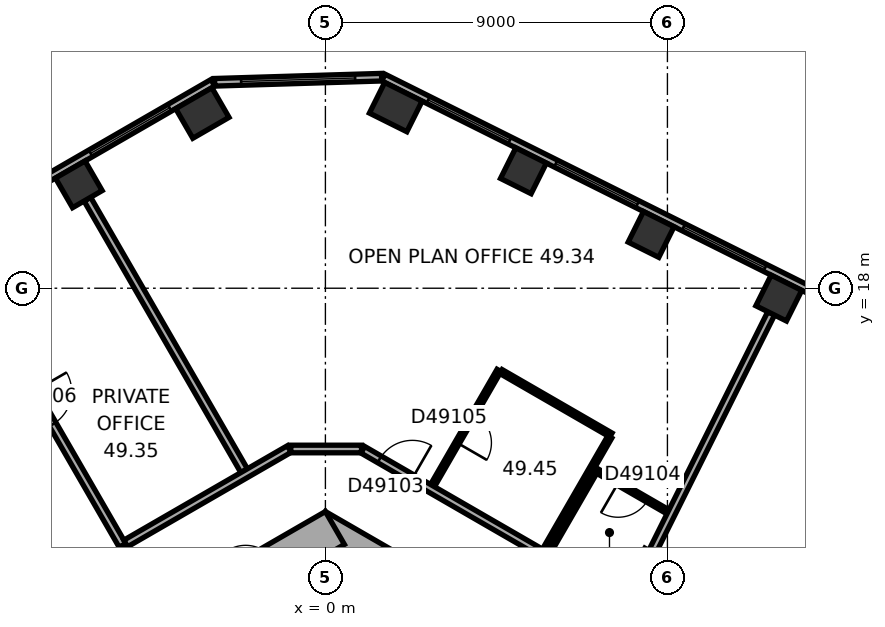
"""IFC4 building model, lengths in metres.
Left out: names, types, materials, properties, quantities, classifications, styles, units other than length and angle.
Written with IfcOpenShell. Run it as: python <this file> out.ifc"""

import sys

from ifc_helpers import new_model, si_unit, direction, frame, frame_2d, origin, origin_2d, place, context, subcontext, project, spatial, rectangle, extrude, element, fill, save


model = new_model("IFC4")
c1 = context("Model", 3, precision=1e-05, world=origin(), true_north=direction((0.0, 1.0)))
c2 = subcontext(c1, "Body", "Model", "MODEL_VIEW")
j1 = project(units=[si_unit("LENGTHUNIT", "METRE"), si_unit("PLANEANGLEUNIT", "RADIAN")], contexts=[c1])
p1 = place(None, origin())
s1 = spatial("IfcSite", under=j1, at=p1, CompositionType="ELEMENT")
p2 = place(p1, origin())
s2 = spatial("IfcBuilding", under=s1, at=p2, CompositionType="ELEMENT")
p3 = place(p2, frame((0.0, 0.0, 198.4)))
s3 = spatial("IfcBuildingStorey", under=s2, at=p3, CompositionType="ELEMENT", Elevation=198.4)
for number, where, z_axis, x_axis in (
    (1, (11.931, 17.74, 0.0), (0.0, 0.0, 1.0), (-0.895, 0.446, 0.0)),
    (2, (8.571, 19.416, 0.0), (0.0, 0.0, 1.0), (-0.895, 0.446, 0.0)),
    (3, (5.211, 21.091, 0.0), (0.0, 0.0, 1.0), (-0.895, 0.446, 0.0)),
):
    element("IfcColumn", number, at=place(p3, frame(where, z_axis=z_axis, x_axis=x_axis)), inside=s3, PredefinedType="COLUMN", context=c2, shape_type="SweptSolid", body=[
        extrude(rectangle(XDim=0.9, YDim=0.9, at=origin_2d()), origin(), (0.0, 0.0, 1.0), 3.7),
    ])
for number, where, z_axis, x_axis in (
    (4, (1.852, 22.766, 0.0), (0.0, 0.0, 1.0), (-0.895, 0.446, 0.0)),
    (5, (-3.238, 22.61, 0.0), (0.0, 0.0, 1.0), (-0.866, -0.5, 0.0)),
):
    element("IfcColumn", number, at=place(p3, frame(where, z_axis=z_axis, x_axis=x_axis)), inside=s3, PredefinedType="COLUMN", context=c2, shape_type="SweptSolid", body=[
        extrude(rectangle(XDim=1.1, YDim=0.9, at=origin_2d()), origin(), (0.0, 0.0, 1.0), 3.7),
    ])
p4 = place(p3, frame((-6.489, 20.733, 0.0), z_axis=(0.0, 0.0, 1.0), x_axis=(-0.866025403784, -0.5, 0.0)))
e6 = element("IfcColumn", 6, at=p4, inside=s3, PredefinedType="COLUMN", context=c2, shape_type="SweptSolid", body=[
    extrude(rectangle(XDim=0.9, YDim=0.9, at=origin_2d()), origin(), (0.0, 0.0, 1.0), 3.7),
])
p5 = place(p3, frame((10.25, 5.629, 0.0), z_axis=(0.0, 0.0, 1.0), x_axis=(-0.866022616891, 0.50000482701, 0.0)))
e7 = element("IfcWall", 7, at=p5, inside=s3, PredefinedType="SHEAR", context=c2, shape_type="SweptSolid", body=[
    extrude(rectangle(XDim=12.125, YDim=1.0, at=frame_2d((6.062, 0.0))), origin(), (0.0, 0.0, 1.0), 3.7),
])
p6 = place(p5, frame((2.712, 0.0, 0.0)))
e8 = element("IfcOpeningElement", 8, at=p6, cuts=e7, PredefinedType="OPENING", context=c2, shape_type="SweptSolid", body=[
    extrude(rectangle(XDim=0.9, YDim=2.1, at=frame_2d((0.45, 1.05))), frame((0.0, 0.51, 0.0), z_axis=(0.0, -1.0, 0.0), x_axis=(1.0, 0.0, 0.0)), (0.0, 0.0, 1.0), 1.02),
])
p7 = place(p5, frame((6.612, 0.0, 0.0)))
e9 = element("IfcOpeningElement", 9, at=p7, cuts=e7, PredefinedType="OPENING", context=c2, shape_type="SweptSolid", body=[
    extrude(rectangle(XDim=0.9, YDim=2.1, at=frame_2d((0.45, 1.05))), frame((0.0, 0.51, 0.0), z_axis=(0.0, -1.0, 0.0), x_axis=(1.0, 0.0, 0.0)), (0.0, 0.0, 1.0), 1.02),
])
p8 = place(p3, frame((0.25, 11.691, 0.0), z_axis=(0.0, 0.0, 1.0), x_axis=(-0.866022616891, -0.50000482701, 0.0)))
e10 = element("IfcWall", 10, at=p8, inside=s3, PredefinedType="SHEAR", context=c2, shape_type="SweptSolid", body=[
    extrude(rectangle(XDim=12.125, YDim=1.0, at=frame_2d((6.062, 0.0))), origin(), (0.0, 0.0, 1.0), 3.7),
])
p9 = place(p8, frame((6.262, 0.0, 0.0)))
e11 = element("IfcOpeningElement", 11, at=p9, cuts=e10, PredefinedType="OPENING", context=c2, shape_type="SweptSolid", body=[
    extrude(rectangle(XDim=1.5, YDim=2.1, at=frame_2d((0.75, 1.05))), frame((0.0, 0.51, 0.0), z_axis=(0.0, -1.0, 0.0), x_axis=(1.0, 0.0, 0.0)), (0.0, 0.0, 1.0), 1.02),
])
p10 = place(p8, frame((1.812, 0.0, 0.0)))
e12 = element("IfcOpeningElement", 12, at=p10, cuts=e10, PredefinedType="OPENING", context=c2, shape_type="SweptSolid", body=[
    extrude(rectangle(XDim=0.9, YDim=2.1, at=frame_2d((0.45, 1.05))), frame((0.0, 0.51, 0.0), z_axis=(0.0, -1.0, 0.0), x_axis=(1.0, 0.0, 0.0)), (0.0, 0.0, 1.0), 1.02),
])
p11 = place(p8, frame((4.412, 0.0, 0.0)))
e13 = element("IfcOpeningElement", 13, at=p11, cuts=e10, PredefinedType="OPENING", context=c2, shape_type="SweptSolid", body=[
    extrude(rectangle(XDim=0.9, YDim=2.1, at=frame_2d((0.45, 1.05))), frame((0.0, 0.51, 0.0), z_axis=(0.0, -1.0, 0.0), x_axis=(1.0, 0.0, 0.0)), (0.0, 0.0, 1.0), 1.02),
])
p12 = place(p3, frame((19.464, 14.599, 0.0), z_axis=(0.0, 0.0, 1.0), x_axis=(-0.894935755043, 0.446195018289, 0.0)))
e14 = element("IfcWall", 14, at=p12, inside=s3, PredefinedType="STANDARD", context=c2, shape_type="SweptSolid", body=[
    extrude(rectangle(XDim=20.044, YDim=0.2, at=frame_2d((10.022, 0.0))), origin(), (0.0, 0.0, 1.0), 3.7),
])
p13 = place(p12, frame((1.313, 0.0, 0.9)))
e15 = element("IfcOpeningElement", 15, at=p13, cuts=e14, PredefinedType="OPENING", context=c2, shape_type="SweptSolid", body=[
    extrude(rectangle(XDim=2.4, YDim=2.0, at=frame_2d((1.2, 1.0))), frame((0.0, 0.11, 0.0), z_axis=(0.0, -1.0, 0.0), x_axis=(1.0, 0.0, 0.0)), (0.0, 0.0, 1.0), 0.22),
])
p14 = place(p12, frame((5.067, 0.0, 0.9)))
e16 = element("IfcOpeningElement", 16, at=p14, cuts=e14, PredefinedType="OPENING", context=c2, shape_type="SweptSolid", body=[
    extrude(rectangle(XDim=2.4, YDim=2.0, at=frame_2d((1.2, 1.0))), frame((0.0, 0.11, 0.0), z_axis=(0.0, -1.0, 0.0), x_axis=(1.0, 0.0, 0.0)), (0.0, 0.0, 1.0), 0.22),
])
p15 = place(p12, frame((8.821, 0.0, 0.9)))
e17 = element("IfcOpeningElement", 17, at=p15, cuts=e14, PredefinedType="OPENING", context=c2, shape_type="SweptSolid", body=[
    extrude(rectangle(XDim=2.4, YDim=2.0, at=frame_2d((1.2, 1.0))), frame((0.0, 0.11, 0.0), z_axis=(0.0, -1.0, 0.0), x_axis=(1.0, 0.0, 0.0)), (0.0, 0.0, 1.0), 0.22),
])
p16 = place(p12, frame((12.575, 0.0, 0.9)))
e18 = element("IfcOpeningElement", 18, at=p16, cuts=e14, PredefinedType="OPENING", context=c2, shape_type="SweptSolid", body=[
    extrude(rectangle(XDim=2.4, YDim=2.0, at=frame_2d((1.2, 1.0))), frame((0.0, 0.11, 0.0), z_axis=(0.0, -1.0, 0.0), x_axis=(1.0, 0.0, 0.0)), (0.0, 0.0, 1.0), 0.22),
])
p17 = place(p12, frame((16.329, 0.0, 0.9)))
e19 = element("IfcOpeningElement", 19, at=p17, cuts=e14, PredefinedType="OPENING", context=c2, shape_type="SweptSolid", body=[
    extrude(rectangle(XDim=2.4, YDim=2.0, at=frame_2d((1.2, 1.0))), frame((0.0, 0.11, 0.0), z_axis=(0.0, -1.0, 0.0), x_axis=(1.0, 0.0, 0.0)), (0.0, 0.0, 1.0), 0.22),
])
p18 = place(p3, frame((1.479, 23.553, 0.0), z_axis=(0.0, 0.0, 1.0), x_axis=(-0.999534786117, -0.03049936625, 0.0)))
e20 = element("IfcWall", 20, at=p18, inside=s3, PredefinedType="STANDARD", context=c2, shape_type="SweptSolid", body=[
    extrude(rectangle(XDim=4.395, YDim=0.2, at=frame_2d((2.197, 0.0))), origin(), (0.0, 0.0, 1.0), 3.7),
])
p19 = place(p18, frame((0.698, 0.0, 0.9)))
e21 = element("IfcOpeningElement", 21, at=p19, cuts=e20, PredefinedType="OPENING", context=c2, shape_type="SweptSolid", body=[
    extrude(rectangle(XDim=3.0, YDim=2.0, at=frame_2d((1.5, 1.0))), frame((0.0, 0.11, 0.0), z_axis=(0.0, -1.0, 0.0), x_axis=(1.0, 0.0, 0.0)), (0.0, 0.0, 1.0), 0.22),
])
p20 = place(p3, frame((-2.961, 23.405, 0.0), z_axis=(0.0, 0.0, 1.0), x_axis=(-0.866023315909, -0.500003616288, 0.0)))
e22 = element("IfcWall", 22, at=p20, inside=s3, PredefinedType="STANDARD", context=c2, shape_type="SweptSolid", body=[
    extrude(rectangle(XDim=20.044, YDim=0.2, at=frame_2d((10.022, 0.0))), origin(), (0.0, 0.0, 1.0), 3.7),
])
p21 = place(p20, frame((1.314, 0.0, 0.9)))
e23 = element("IfcOpeningElement", 23, at=p21, cuts=e22, PredefinedType="OPENING", context=c2, shape_type="SweptSolid", body=[
    extrude(rectangle(XDim=2.4, YDim=2.0, at=frame_2d((1.2, 1.0))), frame((0.0, 0.11, 0.0), z_axis=(0.0, -1.0, 0.0), x_axis=(1.0, 0.0, 0.0)), (0.0, 0.0, 1.0), 0.22),
])
p22 = place(p20, frame((5.069, 0.0, 0.9)))
e24 = element("IfcOpeningElement", 24, at=p22, cuts=e22, PredefinedType="OPENING", context=c2, shape_type="SweptSolid", body=[
    extrude(rectangle(XDim=2.4, YDim=2.0, at=frame_2d((1.2, 1.0))), frame((0.0, 0.11, 0.0), z_axis=(0.0, -1.0, 0.0), x_axis=(1.0, 0.0, 0.0)), (0.0, 0.0, 1.0), 0.22),
])
p23 = place(p20, frame((8.823, 0.0, 0.9)))
e25 = element("IfcOpeningElement", 25, at=p23, cuts=e22, PredefinedType="OPENING", context=c2, shape_type="SweptSolid", body=[
    extrude(rectangle(XDim=2.4, YDim=2.0, at=frame_2d((1.2, 1.0))), frame((0.0, 0.11, 0.0), z_axis=(0.0, -1.0, 0.0), x_axis=(1.0, 0.0, 0.0)), (0.0, 0.0, 1.0), 0.22),
])
p24 = place(p20, frame((12.577, 0.0, 0.9)))
e26 = element("IfcOpeningElement", 26, at=p24, cuts=e22, PredefinedType="OPENING", context=c2, shape_type="SweptSolid", body=[
    extrude(rectangle(XDim=2.4, YDim=2.0, at=frame_2d((1.2, 1.0))), frame((0.0, 0.11, 0.0), z_axis=(0.0, -1.0, 0.0), x_axis=(1.0, 0.0, 0.0)), (0.0, 0.0, 1.0), 0.22),
])
p25 = place(p20, frame((16.331, 0.0, 0.9)))
e27 = element("IfcOpeningElement", 27, at=p25, cuts=e22, PredefinedType="OPENING", context=c2, shape_type="SweptSolid", body=[
    extrude(rectangle(XDim=2.4, YDim=2.0, at=frame_2d((1.2, 1.0))), frame((0.0, 0.11, 0.0), z_axis=(0.0, -1.0, 0.0), x_axis=(1.0, 0.0, 0.0)), (0.0, 0.0, 1.0), 0.22),
])
p26 = place(p3, frame((-9.515, 18.466, 0.0), z_axis=(0.0, 0.0, 1.0), x_axis=(0.500010139422, -0.866019549707, 0.0)))
e28 = element("IfcWall", 28, at=p26, inside=s3, PredefinedType="PARTITIONING", context=c2, shape_type="SweptSolid", body=[
    extrude(rectangle(XDim=8.35, YDim=0.2, at=frame_2d((4.175, 0.0))), origin(), (0.0, 0.0, 1.0), 2.87),
])
p27 = place(p26, frame((3.675, 0.0, 0.0)))
e29 = element("IfcOpeningElement", 29, at=p27, cuts=e28, PredefinedType="OPENING", context=c2, shape_type="SweptSolid", body=[
    extrude(rectangle(XDim=1.0, YDim=2.1, at=frame_2d((0.5, 1.05))), frame((0.0, 0.11, 0.0), z_axis=(0.0, -1.0, 0.0), x_axis=(1.0, 0.0, 0.0)), (0.0, 0.0, 1.0), 0.22),
])
p28 = place(p3, frame((-6.264, 20.344, 0.0), z_axis=(0.0, 0.0, 1.0), x_axis=(0.499996545922, -0.866027397988, 0.0)))
e30 = element("IfcWall", 30, at=p28, inside=s3, PredefinedType="PARTITIONING", context=c2, shape_type="SweptSolid", body=[
    extrude(rectangle(XDim=8.25, YDim=0.2, at=frame_2d((4.125, 0.0))), origin(), (0.0, 0.0, 1.0), 3.42),
])
p29 = place(p3, frame((-0.95, 13.77, 0.0), z_axis=(0.0, 0.0, 1.0), x_axis=(-0.866036689987, -0.499980451214, 0.0)))
e31 = element("IfcWall", 31, at=p29, inside=s3, PredefinedType="PARTITIONING", context=c2, shape_type="SweptSolid", body=[
    extrude(rectangle(XDim=4.969, YDim=0.2, at=frame_2d((2.485, 0.0))), origin(), (0.0, 0.0, 1.0), 3.42),
])
p30 = place(p3, frame((0.95, 13.77, 0.0), z_axis=(0.0, 0.0, 1.0), x_axis=(-1.0, 0.0, 0.0)))
e32 = element("IfcWall", 32, at=p30, inside=s3, PredefinedType="PARTITIONING", context=c2, shape_type="SweptSolid", body=[
    extrude(rectangle(XDim=1.86, YDim=0.2, at=frame_2d((0.93, 0.0))), origin(), (0.0, 0.0, 1.0), 3.42),
])
p31 = place(p3, frame((2.819, 12.806, 0.0), z_axis=(0.0, 0.0, 1.0), x_axis=(0.500010275428, 0.866019471182, 0.0)))
e33 = element("IfcWall", 33, at=p31, inside=s3, PredefinedType="PARTITIONING", context=c2, shape_type="SweptSolid", body=[
    extrude(rectangle(XDim=3.5, YDim=0.12, at=frame_2d((1.75, 0.0))), origin(), (0.0, 0.0, 1.0), 3.42),
])
p32 = place(p31, frame((1.3, 0.0, 0.0)))
e34 = element("IfcOpeningElement", 34, at=p32, cuts=e33, PredefinedType="OPENING", context=c2, shape_type="SweptSolid", body=[
    extrude(rectangle(XDim=0.9, YDim=2.1, at=frame_2d((0.45, 1.05))), frame((0.0, 0.07, 0.0), z_axis=(0.0, -1.0, 0.0), x_axis=(1.0, 0.0, 0.0)), (0.0, 0.0, 1.0), 0.14),
])
p33 = place(p3, frame((4.621, 15.807, 0.0), z_axis=(0.0, 0.0, 1.0), x_axis=(0.866039519639, -0.499975549825, 0.0)))
e35 = element("IfcWall", 35, at=p33, inside=s3, PredefinedType="PARTITIONING", context=c2, shape_type="SweptSolid", body=[
    extrude(rectangle(XDim=3.34, YDim=0.12, at=frame_2d((1.67, 0.0))), origin(), (0.0, 0.0, 1.0), 3.42),
])
p34 = place(p3, frame((5.713, 11.02, 0.0), z_axis=(0.0, 0.0, 1.0), x_axis=(-0.866038905227, 0.499976614087, 0.0)))
e36 = element("IfcWall", 36, at=p34, inside=s3, PredefinedType="PARTITIONING", context=c2, shape_type="SweptSolid", body=[
    extrude(rectangle(XDim=5.46, YDim=0.2, at=frame_2d((2.73, 0.0))), origin(), (0.0, 0.0, 1.0), 3.42),
])
p35 = place(p34, frame((3.955, 0.0, 0.0)))
e37 = element("IfcOpeningElement", 37, at=p35, cuts=e36, PredefinedType="OPENING", context=c2, shape_type="SweptSolid", body=[
    extrude(rectangle(XDim=1.0, YDim=2.1, at=frame_2d((0.5, 1.05))), frame((0.0, 0.11, 0.0), z_axis=(0.0, -1.0, 0.0), x_axis=(1.0, 0.0, 0.0)), (0.0, 0.0, 1.0), 0.22),
])
p36 = place(p3, frame((5.867, 11.046, 0.0), z_axis=(0.0, 0.0, 1.0), x_axis=(0.500004234368, 0.866022959057, 0.0)))
e38 = element("IfcWall", 38, at=p36, inside=s3, PredefinedType="PARTITIONING", context=c2, shape_type="SweptSolid", body=[
    extrude(rectangle(XDim=2.5, YDim=0.12, at=frame_2d((1.25, 0.0))), origin(), (0.0, 0.0, 1.0), 3.42),
])
p37 = place(p3, frame((7.169, 13.181, 0.0), z_axis=(0.0, 0.0, 1.0), x_axis=(0.866048165231, -0.499960573946, 0.0)))
e39 = element("IfcWall", 39, at=p37, inside=s3, PredefinedType="PARTITIONING", context=c2, shape_type="SweptSolid", body=[
    extrude(rectangle(XDim=2.13, YDim=0.12, at=frame_2d((1.065, 0.0))), origin(), (0.0, 0.0, 1.0), 3.42),
])
p38 = place(p37, frame((0.615, 0.0, 0.0)))
e40 = element("IfcOpeningElement", 40, at=p38, cuts=e39, PredefinedType="OPENING", context=c2, shape_type="SweptSolid", body=[
    extrude(rectangle(XDim=0.9, YDim=2.1, at=frame_2d((0.45, 1.05))), frame((0.0, 0.07, 0.0), z_axis=(0.0, -1.0, 0.0), x_axis=(1.0, 0.0, 0.0)), (0.0, 0.0, 1.0), 0.14),
])
p39 = place(p3, frame((7.483, 14.085, 0.0), z_axis=(0.0, 0.0, 1.0), x_axis=(-0.499978425106, -0.866037859697, 0.0)))
e41 = element("IfcWall", 41, at=p39, inside=s3, PredefinedType="PARTITIONING", context=c2, shape_type="SweptSolid", body=[
    extrude(rectangle(XDim=3.44, YDim=0.12, at=frame_2d((1.72, 0.0))), origin(), (0.0, 0.0, 1.0), 3.42),
])
p40 = place(p3, frame((11.73, 17.338, 0.0), z_axis=(0.0, 0.0, 1.0), x_axis=(-0.446189718314, -0.894938397473, 0.0)))
e42 = element("IfcWall", 42, at=p40, inside=s3, PredefinedType="PARTITIONING", context=c2, shape_type="SweptSolid", body=[
    extrude(rectangle(XDim=8.396, YDim=0.2, at=frame_2d((4.198, 0.0))), origin(), (0.0, 0.0, 1.0), 2.87),
])
p41 = place(p15, origin())
e43 = element("IfcWindow", 43, at=p41, inside=s3, PartitioningType="SINGLE_PANEL", PredefinedType="WINDOW", context=c2, shape_type="SweptSolid", body=[
    extrude(rectangle(XDim=2.4, YDim=2.0, at=frame_2d((1.2, 1.0))), frame((0.0, 0.03, 0.0), z_axis=(0.0, -1.0, 0.0), x_axis=(1.0, 0.0, 0.0)), (0.0, 0.0, 1.0), 0.06),
])
fill(e17, e43)
p42 = place(p16, origin())
e44 = element("IfcWindow", 44, at=p42, inside=s3, PartitioningType="SINGLE_PANEL", PredefinedType="WINDOW", context=c2, shape_type="SweptSolid", body=[
    extrude(rectangle(XDim=2.4, YDim=2.0, at=frame_2d((1.2, 1.0))), frame((0.0, 0.03, 0.0), z_axis=(0.0, -1.0, 0.0), x_axis=(1.0, 0.0, 0.0)), (0.0, 0.0, 1.0), 0.06),
])
fill(e18, e44)
p43 = place(p17, origin())
e45 = element("IfcWindow", 45, at=p43, inside=s3, PartitioningType="SINGLE_PANEL", PredefinedType="WINDOW", context=c2, shape_type="SweptSolid", body=[
    extrude(rectangle(XDim=2.4, YDim=2.0, at=frame_2d((1.2, 1.0))), frame((0.0, 0.03, 0.0), z_axis=(0.0, -1.0, 0.0), x_axis=(1.0, 0.0, 0.0)), (0.0, 0.0, 1.0), 0.06),
])
fill(e19, e45)
p44 = place(p19, origin())
e46 = element("IfcWindow", 46, at=p44, inside=s3, PartitioningType="SINGLE_PANEL", PredefinedType="WINDOW", context=c2, shape_type="SweptSolid", body=[
    extrude(rectangle(XDim=3.0, YDim=2.0, at=frame_2d((1.5, 1.0))), frame((0.0, 0.03, 0.0), z_axis=(0.0, -1.0, 0.0), x_axis=(1.0, 0.0, 0.0)), (0.0, 0.0, 1.0), 0.06),
])
fill(e21, e46)
p45 = place(p21, origin())
e47 = element("IfcWindow", 47, at=p45, inside=s3, PartitioningType="SINGLE_PANEL", PredefinedType="WINDOW", context=c2, shape_type="SweptSolid", body=[
    extrude(rectangle(XDim=2.4, YDim=2.0, at=frame_2d((1.2, 1.0))), frame((0.0, 0.03, 0.0), z_axis=(0.0, -1.0, 0.0), x_axis=(1.0, 0.0, 0.0)), (0.0, 0.0, 1.0), 0.06),
])
fill(e23, e47)
p46 = place(p35, origin())
e48 = element("IfcDoor", 48, at=p46, inside=s3, OperationType="SINGLE_SWING_LEFT", PredefinedType="DOOR", context=c2, shape_type="SweptSolid", body=[
    extrude(rectangle(XDim=1.0, YDim=2.1, at=frame_2d((0.5, 1.05))), frame((0.0, 0.025, 0.0), z_axis=(0.0, -1.0, 0.0), x_axis=(1.0, 0.0, 0.0)), (0.0, 0.0, 1.0), 0.05),
])
fill(e37, e48)
p47 = place(p38, origin())
e49 = element("IfcDoor", 49, at=p47, inside=s3, OperationType="SINGLE_SWING_LEFT", PredefinedType="DOOR", context=c2, shape_type="SweptSolid", body=[
    extrude(rectangle(XDim=0.9, YDim=2.1, at=frame_2d((0.45, 1.05))), frame((0.0, 0.025, 0.0), z_axis=(0.0, -1.0, 0.0), x_axis=(1.0, 0.0, 0.0)), (0.0, 0.0, 1.0), 0.05),
])
fill(e40, e49)
p48 = place(p32, origin())
e50 = element("IfcDoor", 50, at=p48, inside=s3, OperationType="SINGLE_SWING_LEFT", PredefinedType="DOOR", context=c2, shape_type="SweptSolid", body=[
    extrude(rectangle(XDim=0.9, YDim=2.1, at=frame_2d((0.45, 1.05))), frame((0.0, 0.025, 0.0), z_axis=(0.0, -1.0, 0.0), x_axis=(1.0, 0.0, 0.0)), (0.0, 0.0, 1.0), 0.05),
])
fill(e34, e50)
p49 = place(p27, origin())
e51 = element("IfcDoor", 51, at=p49, inside=s3, OperationType="SINGLE_SWING_LEFT", PredefinedType="DOOR", context=c2, shape_type="SweptSolid", body=[
    extrude(rectangle(XDim=1.0, YDim=2.1, at=frame_2d((0.5, 1.05))), frame((0.0, 0.025, 0.0), z_axis=(0.0, -1.0, 0.0), x_axis=(1.0, 0.0, 0.0)), (0.0, 0.0, 1.0), 0.05),
])
fill(e29, e51)
save(model, sys.argv[1])
